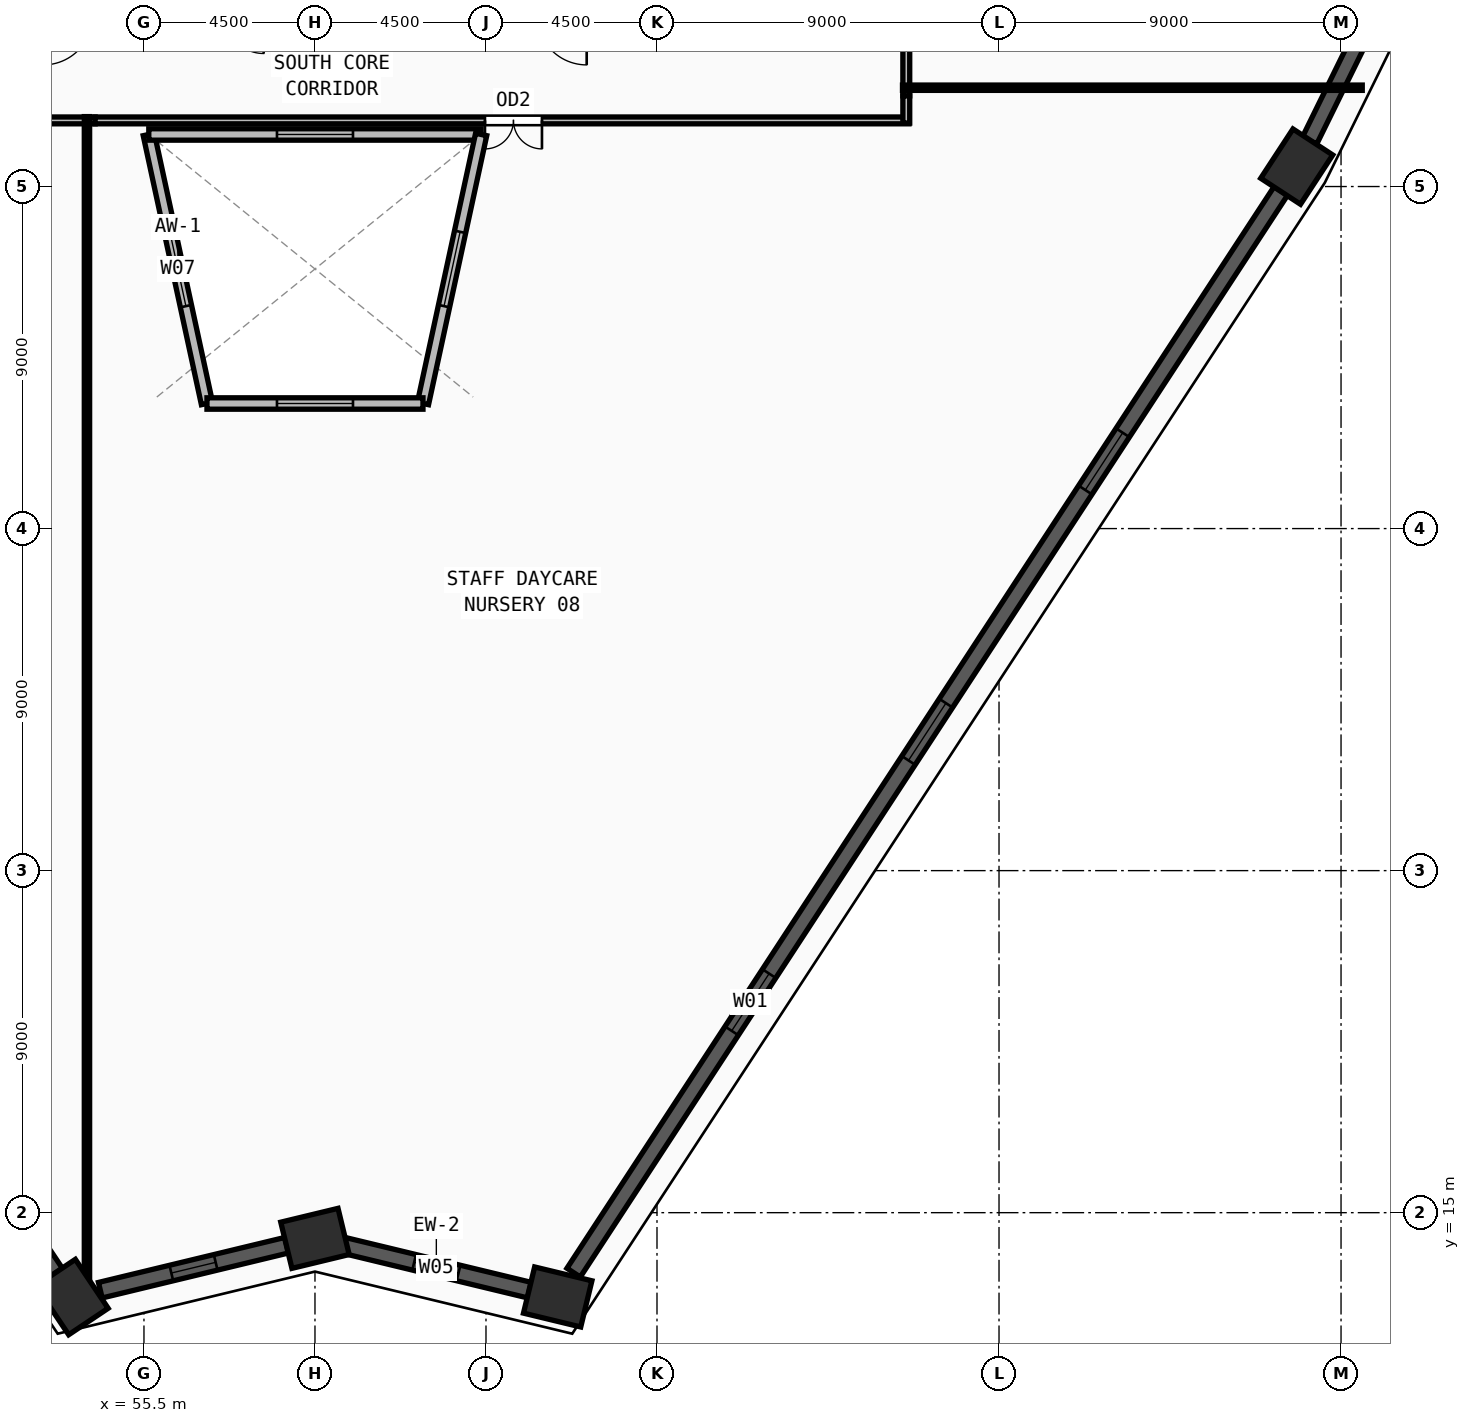
"""IFC4 building model, lengths in metres.
Left out: names, types, materials, properties, quantities, classifications, styles, units other than length and angle.
Written with IfcOpenShell. Run it as: python <this file> out.ifc"""

import sys

from ifc_helpers import new_model, si_unit, direction, frame, frame_2d, origin, origin_2d, place, context, subcontext, project, spatial, rectangle, extrude, source, transform, mapped, element, fill, save


model = new_model("IFC4")
c1 = context("Model", 3, precision=1e-05, world=origin(), true_north=direction((0.0, 1.0)))
c2 = subcontext(c1, "Body", "Model", "MODEL_VIEW")
j1 = project(units=[si_unit("LENGTHUNIT", "METRE"), si_unit("PLANEANGLEUNIT", "RADIAN")], contexts=[c1])
p1 = place(None, origin())
s1 = spatial("IfcSite", under=j1, at=p1, CompositionType="ELEMENT")
p2 = place(p1, origin())
s2 = spatial("IfcBuilding", under=s1, at=p2, CompositionType="ELEMENT")
p3 = place(p2, frame((0.0, 0.0, 39.75)))
s3 = spatial("IfcBuildingStorey", under=s2, at=p3, CompositionType="ELEMENT", Elevation=39.75)
m1 = source(origin(), c2, "Body", "SweptSolid", [
    extrude(rectangle(XDim=1.55, YDim=1.25, at=origin_2d()), origin(), (0.0, 0.0, 1.0), 3.75),
])
for number, where, z_axis, x_axis in (
    (1, (53.607, 12.78, 0.0), (0.0, 0.0, 1.0), (-0.556, 0.831, 0.0)),
    (2, (85.834, 42.524, 0.0), (0.0, 0.0, 1.0), (0.547, 0.837, 0.0)),
    (3, (66.387, 12.782, 0.0), (0.0, 0.0, 1.0), (-0.972, 0.235, 0.0)),
    (4, (60.0, 14.324, 0.0), (0.0, 0.0, 1.0), (0.972, 0.235, 0.0)),
):
    element("IfcColumn", number, at=place(p3, frame(where, z_axis=z_axis, x_axis=x_axis)), inside=s3, PredefinedType="COLUMN", context=c2, shape_type="MappedRepresentation", body=[
        mapped(m1, transform((0.0, 0.0, 0.0), x_axis=(1.0, 0.0, 0.0), y_axis=(0.0, 1.0, 0.0), z_axis=(0.0, 0.0, 1.0), scale=1.0)),
    ])
p4 = place(p3, frame((60.744, 14.144, 0.0), z_axis=(0.0, 0.0, 1.0), x_axis=(0.972101636789, -0.234560030166, 0.0)))
e5 = element("IfcWall", 5, at=p4, inside=s3, PredefinedType="SOLIDWALL", context=c2, shape_type="SweptSolid", body=[
    extrude(rectangle(XDim=5.04, YDim=0.42, at=frame_2d((2.52, 0.0))), origin(), (0.0, 0.0, 1.0), 3.57),
])
m2 = source(origin(), c2, "Body", "SweptSolid", [
    extrude(rectangle(XDim=1.2, YDim=1.9, at=frame_2d((0.6, 0.95))), frame((0.0, 0.22, 0.0), z_axis=(0.0, -1.0, 0.0), x_axis=(1.0, 0.0, 0.0)), (0.0, 0.0, 1.0), 0.44),
])
p5 = place(p4, frame((1.92, 0.0, 0.55)))
e6 = element("IfcOpeningElement", 6, at=p5, cuts=e5, PredefinedType="OPENING", context=c2, shape_type="MappedRepresentation", body=[
    mapped(m2, transform((0.0, 0.0, 0.0), x_axis=(1.0, 0.0, 0.0), y_axis=(0.0, 1.0, 0.0), z_axis=(0.0, 0.0, 1.0), scale=1.0)),
])
p6 = place(p3, frame((66.806, 13.422, 0.0), z_axis=(0.0, 0.0, 1.0), x_axis=(0.547237369938, 0.836977455457, 0.0)))
e7 = element("IfcWall", 7, at=p6, inside=s3, PredefinedType="SOLIDWALL", context=c2, shape_type="SweptSolid", body=[
    extrude(rectangle(XDim=34.006, YDim=0.42, at=frame_2d((17.003, 0.0))), origin(), (0.0, 0.0, 1.0), 3.57),
])
m3 = source(origin(), c2, "Body", "SweptSolid", [
    extrude(rectangle(XDim=1.8, YDim=1.95, at=frame_2d((0.9, 0.975))), frame((0.0, 0.22, 0.0), z_axis=(0.0, -1.0, 0.0), x_axis=(1.0, 0.0, 0.0)), (0.0, 0.0, 1.0), 0.44),
])
p7 = place(p6, frame((7.601, 0.0, 0.55)))
e8 = element("IfcOpeningElement", 8, at=p7, cuts=e7, PredefinedType="OPENING", context=c2, shape_type="MappedRepresentation", body=[
    mapped(m3, transform((0.0, 0.0, 0.0), x_axis=(1.0, 0.0, 0.0), y_axis=(0.0, 1.0, 0.0), z_axis=(0.0, 0.0, 1.0), scale=1.0)),
])
p8 = place(p6, frame((16.103, 0.0, 0.55)))
e9 = element("IfcOpeningElement", 9, at=p8, cuts=e7, PredefinedType="OPENING", context=c2, shape_type="MappedRepresentation", body=[
    mapped(m3, transform((0.0, 0.0, 0.0), x_axis=(1.0, 0.0, 0.0), y_axis=(0.0, 1.0, 0.0), z_axis=(0.0, 0.0, 1.0), scale=1.0)),
])
p9 = place(p6, frame((24.604, 0.0, 0.55)))
e10 = element("IfcOpeningElement", 10, at=p9, cuts=e7, PredefinedType="OPENING", context=c2, shape_type="MappedRepresentation", body=[
    mapped(m3, transform((0.0, 0.0, 0.0), x_axis=(1.0, 0.0, 0.0), y_axis=(0.0, 1.0, 0.0), z_axis=(0.0, 0.0, 1.0), scale=1.0)),
])
p10 = place(p3, frame((86.172, 43.21, 0.0), z_axis=(0.0, 0.0, 1.0), x_axis=(0.441367208162, 0.897326577985, 0.0)))
e11 = element("IfcWall", 11, at=p10, inside=s3, PredefinedType="SOLIDWALL", context=c2, shape_type="SweptSolid", body=[
    extrude(rectangle(XDim=28.058, YDim=0.42, at=frame_2d((14.029, 0.0))), origin(), (0.0, 0.0, 1.0), 3.57),
])
p11 = place(p10, frame((8.314, 0.0, 0.55)))
e12 = element("IfcOpeningElement", 12, at=p11, cuts=e11, PredefinedType="OPENING", context=c2, shape_type="MappedRepresentation", body=[
    mapped(m3, transform((0.0, 0.0, 0.0), x_axis=(1.0, 0.0, 0.0), y_axis=(0.0, 1.0, 0.0), z_axis=(0.0, 0.0, 1.0), scale=1.0)),
])
p12 = place(p10, frame((13.129, 0.0, 0.55)))
e13 = element("IfcOpeningElement", 13, at=p12, cuts=e11, PredefinedType="OPENING", context=c2, shape_type="MappedRepresentation", body=[
    mapped(m3, transform((0.0, 0.0, 0.0), x_axis=(1.0, 0.0, 0.0), y_axis=(0.0, 1.0, 0.0), z_axis=(0.0, 0.0, 1.0), scale=1.0)),
])
p13 = place(p10, frame((20.143, 0.0, 0.55)))
e14 = element("IfcOpeningElement", 14, at=p13, cuts=e11, PredefinedType="OPENING", context=c2, shape_type="MappedRepresentation", body=[
    mapped(m3, transform((0.0, 0.0, 0.0), x_axis=(1.0, 0.0, 0.0), y_axis=(0.0, 1.0, 0.0), z_axis=(0.0, 0.0, 1.0), scale=1.0)),
])
p14 = place(p3, frame((37.57, 36.729, 0.0), z_axis=(0.0, 0.0, 1.0), x_axis=(0.556397860577, -0.830916013051, 0.0)))
e15 = element("IfcWall", 15, at=p14, inside=s3, PredefinedType="SOLIDWALL", context=c2, shape_type="SweptSolid", body=[
    extrude(rectangle(XDim=28.057, YDim=0.42, at=frame_2d((14.028, 0.0))), origin(), (0.0, 0.0, 1.0), 3.57),
])
p15 = place(p14, frame((6.114, 0.0, 0.55)))
e16 = element("IfcOpeningElement", 16, at=p15, cuts=e15, PredefinedType="OPENING", context=c2, shape_type="MappedRepresentation", body=[
    mapped(m3, transform((0.0, 0.0, 0.0), x_axis=(1.0, 0.0, 0.0), y_axis=(0.0, 1.0, 0.0), z_axis=(0.0, 0.0, 1.0), scale=1.0)),
])
p16 = place(p14, frame((13.129, 0.0, 0.55)))
e17 = element("IfcOpeningElement", 17, at=p16, cuts=e15, PredefinedType="OPENING", context=c2, shape_type="MappedRepresentation", body=[
    mapped(m3, transform((0.0, 0.0, 0.0), x_axis=(1.0, 0.0, 0.0), y_axis=(0.0, 1.0, 0.0), z_axis=(0.0, 0.0, 1.0), scale=1.0)),
])
p17 = place(p14, frame((20.143, 0.0, 0.55)))
e18 = element("IfcOpeningElement", 18, at=p17, cuts=e15, PredefinedType="OPENING", context=c2, shape_type="MappedRepresentation", body=[
    mapped(m3, transform((0.0, 0.0, 0.0), x_axis=(1.0, 0.0, 0.0), y_axis=(0.0, 1.0, 0.0), z_axis=(0.0, 0.0, 1.0), scale=1.0)),
])
p18 = place(p3, frame((54.351, 12.96, 0.0), z_axis=(0.0, 0.0, 1.0), x_axis=(0.972077261258, 0.234661028177, 0.0)))
e19 = element("IfcWall", 19, at=p18, inside=s3, PredefinedType="SOLIDWALL", context=c2, shape_type="SweptSolid", body=[
    extrude(rectangle(XDim=5.046, YDim=0.42, at=frame_2d((2.523, 0.0))), origin(), (0.0, 0.0, 1.0), 3.57),
])
p19 = place(p18, frame((1.923, 0.0, 0.55)))
e20 = element("IfcOpeningElement", 20, at=p19, cuts=e19, PredefinedType="OPENING", context=c2, shape_type="MappedRepresentation", body=[
    mapped(m2, transform((0.0, 0.0, 0.0), x_axis=(1.0, 0.0, 0.0), y_axis=(0.0, 1.0, 0.0), z_axis=(0.0, 0.0, 1.0), scale=1.0)),
])
p20 = place(p3, frame((57.158, 36.291, 0.0), z_axis=(0.0, 0.0, 1.0), x_axis=(-0.211384142555, 0.977403061319, 0.0)))
e21 = element("IfcWall", 21, at=p20, inside=s3, PredefinedType="SOLIDWALL", context=c2, shape_type="SweptSolid", body=[
    extrude(rectangle(XDim=7.243, YDim=0.3, at=frame_2d((3.621, 0.0))), origin(), (0.0, 0.0, 1.0), 3.57),
])
m4 = source(origin(), c2, "Body", "SweptSolid", [
    extrude(rectangle(XDim=2.0, YDim=1.9, at=frame_2d((1.0, 0.95))), frame((0.0, 0.16, 0.0), z_axis=(0.0, -1.0, 0.0), x_axis=(1.0, 0.0, 0.0)), (0.0, 0.0, 1.0), 0.32),
])
p21 = place(p20, frame((2.621, 0.0, 0.55)))
e22 = element("IfcOpeningElement", 22, at=p21, cuts=e21, PredefinedType="OPENING", context=c2, shape_type="MappedRepresentation", body=[
    mapped(m4, transform((0.0, 0.0, 0.0), x_axis=(1.0, 0.0, 0.0), y_axis=(0.0, 1.0, 0.0), z_axis=(0.0, 0.0, 1.0), scale=1.0)),
])
p22 = place(p3, frame((55.627, 43.37, 0.0), z_axis=(0.0, 0.0, 1.0), x_axis=(1.0, 0.0, 0.0)))
e23 = element("IfcWall", 23, at=p22, inside=s3, PredefinedType="SOLIDWALL", context=c2, shape_type="SweptSolid", body=[
    extrude(rectangle(XDim=8.746, YDim=0.3, at=frame_2d((4.373, 0.0))), origin(), (0.0, 0.0, 1.0), 3.57),
])
p23 = place(p22, frame((3.373, 0.0, 0.55)))
e24 = element("IfcOpeningElement", 24, at=p23, cuts=e23, PredefinedType="OPENING", context=c2, shape_type="MappedRepresentation", body=[
    mapped(m4, transform((0.0, 0.0, 0.0), x_axis=(1.0, 0.0, 0.0), y_axis=(0.0, 1.0, 0.0), z_axis=(0.0, 0.0, 1.0), scale=1.0)),
])
p24 = place(p3, frame((64.373, 43.37, 0.0), z_axis=(0.0, 0.0, 1.0), x_axis=(-0.211384142555, -0.977403061319, 0.0)))
e25 = element("IfcWall", 25, at=p24, inside=s3, PredefinedType="SOLIDWALL", context=c2, shape_type="SweptSolid", body=[
    extrude(rectangle(XDim=7.243, YDim=0.3, at=frame_2d((3.621, 0.0))), origin(), (0.0, 0.0, 1.0), 3.57),
])
p25 = place(p24, frame((2.621, 0.0, 0.55)))
e26 = element("IfcOpeningElement", 26, at=p25, cuts=e25, PredefinedType="OPENING", context=c2, shape_type="MappedRepresentation", body=[
    mapped(m4, transform((0.0, 0.0, 0.0), x_axis=(1.0, 0.0, 0.0), y_axis=(0.0, 1.0, 0.0), z_axis=(0.0, 0.0, 1.0), scale=1.0)),
])
p26 = place(p3, frame((62.842, 36.291, 0.0), z_axis=(0.0, 0.0, 1.0), x_axis=(-1.0, 0.0, 0.0)))
e27 = element("IfcWall", 27, at=p26, inside=s3, PredefinedType="SOLIDWALL", context=c2, shape_type="SweptSolid", body=[
    extrude(rectangle(XDim=5.684, YDim=0.3, at=frame_2d((2.842, 0.0))), origin(), (0.0, 0.0, 1.0), 3.57),
])
p27 = place(p26, frame((1.842, 0.0, 0.55)))
e28 = element("IfcOpeningElement", 28, at=p27, cuts=e27, PredefinedType="OPENING", context=c2, shape_type="MappedRepresentation", body=[
    mapped(m4, transform((0.0, 0.0, 0.0), x_axis=(1.0, 0.0, 0.0), y_axis=(0.0, 1.0, 0.0), z_axis=(0.0, 0.0, 1.0), scale=1.0)),
])
p28 = place(p3, frame((54.215, 43.74, 0.0), z_axis=(0.0, 0.0, 1.0), x_axis=(-1.0, 0.0, 0.0)))
e29 = element("IfcWall", 29, at=p28, inside=s3, PredefinedType="PARTITIONING", context=c2, shape_type="SweptSolid", body=[
    extrude(rectangle(XDim=9.845, YDim=0.18, at=frame_2d((4.922, 0.0))), origin(), (0.0, 0.0, 1.0), 3.57),
])
m5 = source(origin(), c2, "Body", "SweptSolid", [
    extrude(rectangle(XDim=1.5, YDim=2.2, at=frame_2d((0.75, 1.1))), frame((0.0, 0.1, 0.0), z_axis=(0.0, -1.0, 0.0), x_axis=(1.0, 0.0, 0.0)), (0.0, 0.0, 1.0), 0.2),
])
p29 = place(p28, frame((4.173, 0.0, 0.0)))
e30 = element("IfcOpeningElement", 30, at=p29, cuts=e29, PredefinedType="OPENING", context=c2, shape_type="MappedRepresentation", body=[
    mapped(m5, transform((0.0, 0.0, 0.0), x_axis=(1.0, 0.0, 0.0), y_axis=(0.0, 1.0, 0.0), z_axis=(0.0, 0.0, 1.0), scale=1.0)),
])
p30 = place(p3, frame((75.63, 43.74, 0.0), z_axis=(0.0, 0.0, 1.0), x_axis=(-1.0, 0.0, 0.0)))
e31 = element("IfcWall", 31, at=p30, inside=s3, PredefinedType="PARTITIONING", context=c2, shape_type="SweptSolid", body=[
    extrude(rectangle(XDim=21.415, YDim=0.18, at=frame_2d((10.708, 0.0))), origin(), (0.0, 0.0, 1.0), 3.57),
])
p31 = place(p30, frame((9.657, 0.0, 0.0)))
e32 = element("IfcOpeningElement", 32, at=p31, cuts=e31, PredefinedType="OPENING", context=c2, shape_type="MappedRepresentation", body=[
    mapped(m5, transform((0.0, 0.0, 0.0), x_axis=(1.0, 0.0, 0.0), y_axis=(0.0, 1.0, 0.0), z_axis=(0.0, 0.0, 1.0), scale=1.0)),
])
p32 = place(p3, frame((75.56, 49.285, 0.0), z_axis=(0.0, 0.0, 1.0), x_axis=(0.0, -1.0, 0.0)))
e33 = element("IfcWall", 33, at=p32, inside=s3, PredefinedType="PARTITIONING", context=c2, shape_type="SweptSolid", body=[
    extrude(rectangle(XDim=4.9, YDim=0.18, at=frame_2d((2.45, 0.0))), origin(), (0.0, 0.0, 1.0), 3.57),
])
m6 = source(origin(), c2, "Body", "SweptSolid", [
    extrude(rectangle(XDim=1.0, YDim=2.2, at=frame_2d((0.5, 1.1))), frame((0.0, 0.1, 0.0), z_axis=(0.0, -1.0, 0.0), x_axis=(1.0, 0.0, 0.0)), (0.0, 0.0, 1.0), 0.2),
])
p33 = place(p32, frame((1.95, 0.0, 0.0)))
e34 = element("IfcOpeningElement", 34, at=p33, cuts=e33, PredefinedType="OPENING", context=c2, shape_type="MappedRepresentation", body=[
    mapped(m6, transform((0.0, 0.0, 0.0), x_axis=(1.0, 0.0, 0.0), y_axis=(0.0, 1.0, 0.0), z_axis=(0.0, 0.0, 1.0), scale=1.0)),
])
p34 = place(p3, frame((75.56, 44.385, 0.0), z_axis=(0.0, 0.0, 1.0), x_axis=(0.0, -1.0, 0.0)))
e35 = element("IfcWall", 35, at=p34, inside=s3, PredefinedType="PARTITIONING", context=c2, shape_type="SweptSolid", body=[
    extrude(rectangle(XDim=0.715, YDim=0.18, at=frame_2d((0.357, 0.0))), origin(), (0.0, 0.0, 1.0), 3.57),
])
p35 = place(p3, frame((75.46, 44.6, 0.0), z_axis=(0.0, 0.0, 1.0), x_axis=(1.0, 0.0, 0.0)))
e36 = element("IfcWall", 36, at=p35, inside=s3, PredefinedType="PARTITIONING", context=c2, shape_type="SweptSolid", body=[
    extrude(rectangle(XDim=12.098, YDim=0.14, at=frame_2d((6.049, 0.0))), origin(), (0.0, 0.0, 1.0), 2.705),
])
p36 = place(p3, frame((54.0, 43.84, 0.0), z_axis=(0.0, 0.0, 1.0), x_axis=(0.0, -1.0, 0.0)))
e37 = element("IfcWall", 37, at=p36, inside=s3, PredefinedType="PARTITIONING", context=c2, shape_type="SweptSolid", body=[
    extrude(rectangle(XDim=31.613, YDim=0.14, at=frame_2d((15.807, 0.0))), origin(), (0.0, 0.0, 1.0), 3.57),
])
m7 = source(origin(), c2, "Body", "SweptSolid", [
    extrude(rectangle(XDim=1.2, YDim=1.9, at=frame_2d((0.6, 0.95))), frame((0.0, 0.03, 0.0), z_axis=(0.0, -1.0, 0.0), x_axis=(1.0, 0.0, 0.0)), (0.0, 0.0, 1.0), 0.06),
])
p37 = place(p5, origin())
e38 = element("IfcWindow", 38, at=p37, inside=s3, PartitioningType="SINGLE_PANEL", PredefinedType="WINDOW", context=c2, shape_type="MappedRepresentation", body=[
    mapped(m7, transform((0.0, 0.0, 0.0), x_axis=(1.0, 0.0, 0.0), y_axis=(0.0, 1.0, 0.0), z_axis=(0.0, 0.0, 1.0), scale=1.0)),
])
fill(e6, e38)
m8 = source(origin(), c2, "Body", "SweptSolid", [
    extrude(rectangle(XDim=1.8, YDim=1.95, at=frame_2d((0.9, 0.975))), frame((0.0, 0.03, 0.0), z_axis=(0.0, -1.0, 0.0), x_axis=(1.0, 0.0, 0.0)), (0.0, 0.0, 1.0), 0.06),
])
p38 = place(p7, origin())
e39 = element("IfcWindow", 39, at=p38, inside=s3, PartitioningType="DOUBLE_PANEL_VERTICAL", PredefinedType="WINDOW", context=c2, shape_type="MappedRepresentation", body=[
    mapped(m8, transform((0.0, 0.0, 0.0), x_axis=(1.0, 0.0, 0.0), y_axis=(0.0, 1.0, 0.0), z_axis=(0.0, 0.0, 1.0), scale=1.0)),
])
fill(e8, e39)
p39 = place(p8, origin())
e40 = element("IfcWindow", 40, at=p39, inside=s3, PartitioningType="DOUBLE_PANEL_VERTICAL", PredefinedType="WINDOW", context=c2, shape_type="MappedRepresentation", body=[
    mapped(m8, transform((0.0, 0.0, 0.0), x_axis=(1.0, 0.0, 0.0), y_axis=(0.0, 1.0, 0.0), z_axis=(0.0, 0.0, 1.0), scale=1.0)),
])
fill(e9, e40)
p40 = place(p9, origin())
e41 = element("IfcWindow", 41, at=p40, inside=s3, PartitioningType="DOUBLE_PANEL_VERTICAL", PredefinedType="WINDOW", context=c2, shape_type="MappedRepresentation", body=[
    mapped(m8, transform((0.0, 0.0, 0.0), x_axis=(1.0, 0.0, 0.0), y_axis=(0.0, 1.0, 0.0), z_axis=(0.0, 0.0, 1.0), scale=1.0)),
])
fill(e10, e41)
p41 = place(p19, origin())
e42 = element("IfcWindow", 42, at=p41, inside=s3, PartitioningType="SINGLE_PANEL", PredefinedType="WINDOW", context=c2, shape_type="MappedRepresentation", body=[
    mapped(m7, transform((0.0, 0.0, 0.0), x_axis=(1.0, 0.0, 0.0), y_axis=(0.0, 1.0, 0.0), z_axis=(0.0, 0.0, 1.0), scale=1.0)),
])
fill(e20, e42)
m9 = source(origin(), c2, "Body", "SweptSolid", [
    extrude(rectangle(XDim=2.0, YDim=1.9, at=frame_2d((1.0, 0.95))), frame((0.0, 0.03, 0.0), z_axis=(0.0, -1.0, 0.0), x_axis=(1.0, 0.0, 0.0)), (0.0, 0.0, 1.0), 0.06),
])
p42 = place(p21, origin())
e43 = element("IfcWindow", 43, at=p42, inside=s3, PartitioningType="DOUBLE_PANEL_VERTICAL", PredefinedType="WINDOW", context=c2, shape_type="MappedRepresentation", body=[
    mapped(m9, transform((0.0, 0.0, 0.0), x_axis=(1.0, 0.0, 0.0), y_axis=(0.0, 1.0, 0.0), z_axis=(0.0, 0.0, 1.0), scale=1.0)),
])
fill(e22, e43)
p43 = place(p23, origin())
e44 = element("IfcWindow", 44, at=p43, inside=s3, PartitioningType="DOUBLE_PANEL_VERTICAL", PredefinedType="WINDOW", context=c2, shape_type="MappedRepresentation", body=[
    mapped(m9, transform((0.0, 0.0, 0.0), x_axis=(1.0, 0.0, 0.0), y_axis=(0.0, 1.0, 0.0), z_axis=(0.0, 0.0, 1.0), scale=1.0)),
])
fill(e24, e44)
p44 = place(p25, origin())
e45 = element("IfcWindow", 45, at=p44, inside=s3, PartitioningType="DOUBLE_PANEL_VERTICAL", PredefinedType="WINDOW", context=c2, shape_type="MappedRepresentation", body=[
    mapped(m9, transform((0.0, 0.0, 0.0), x_axis=(1.0, 0.0, 0.0), y_axis=(0.0, 1.0, 0.0), z_axis=(0.0, 0.0, 1.0), scale=1.0)),
])
fill(e26, e45)
p45 = place(p27, origin())
e46 = element("IfcWindow", 46, at=p45, inside=s3, PartitioningType="DOUBLE_PANEL_VERTICAL", PredefinedType="WINDOW", context=c2, shape_type="MappedRepresentation", body=[
    mapped(m9, transform((0.0, 0.0, 0.0), x_axis=(1.0, 0.0, 0.0), y_axis=(0.0, 1.0, 0.0), z_axis=(0.0, 0.0, 1.0), scale=1.0)),
])
fill(e28, e46)
m10 = source(origin(), c2, "Body", "SweptSolid", [
    extrude(rectangle(XDim=1.5, YDim=2.2, at=frame_2d((0.75, 1.1))), frame((0.0, 0.025, 0.0), z_axis=(0.0, -1.0, 0.0), x_axis=(1.0, 0.0, 0.0)), (0.0, 0.0, 1.0), 0.05),
])
p46 = place(p31, origin())
e47 = element("IfcDoor", 47, at=p46, inside=s3, OperationType="DOUBLE_DOOR_SINGLE_SWING", PredefinedType="DOOR", context=c2, shape_type="MappedRepresentation", body=[
    mapped(m10, transform((0.0, 0.0, 0.0), x_axis=(1.0, 0.0, 0.0), y_axis=(0.0, 1.0, 0.0), z_axis=(0.0, 0.0, 1.0), scale=1.0)),
])
fill(e32, e47)
save(model, sys.argv[1])
